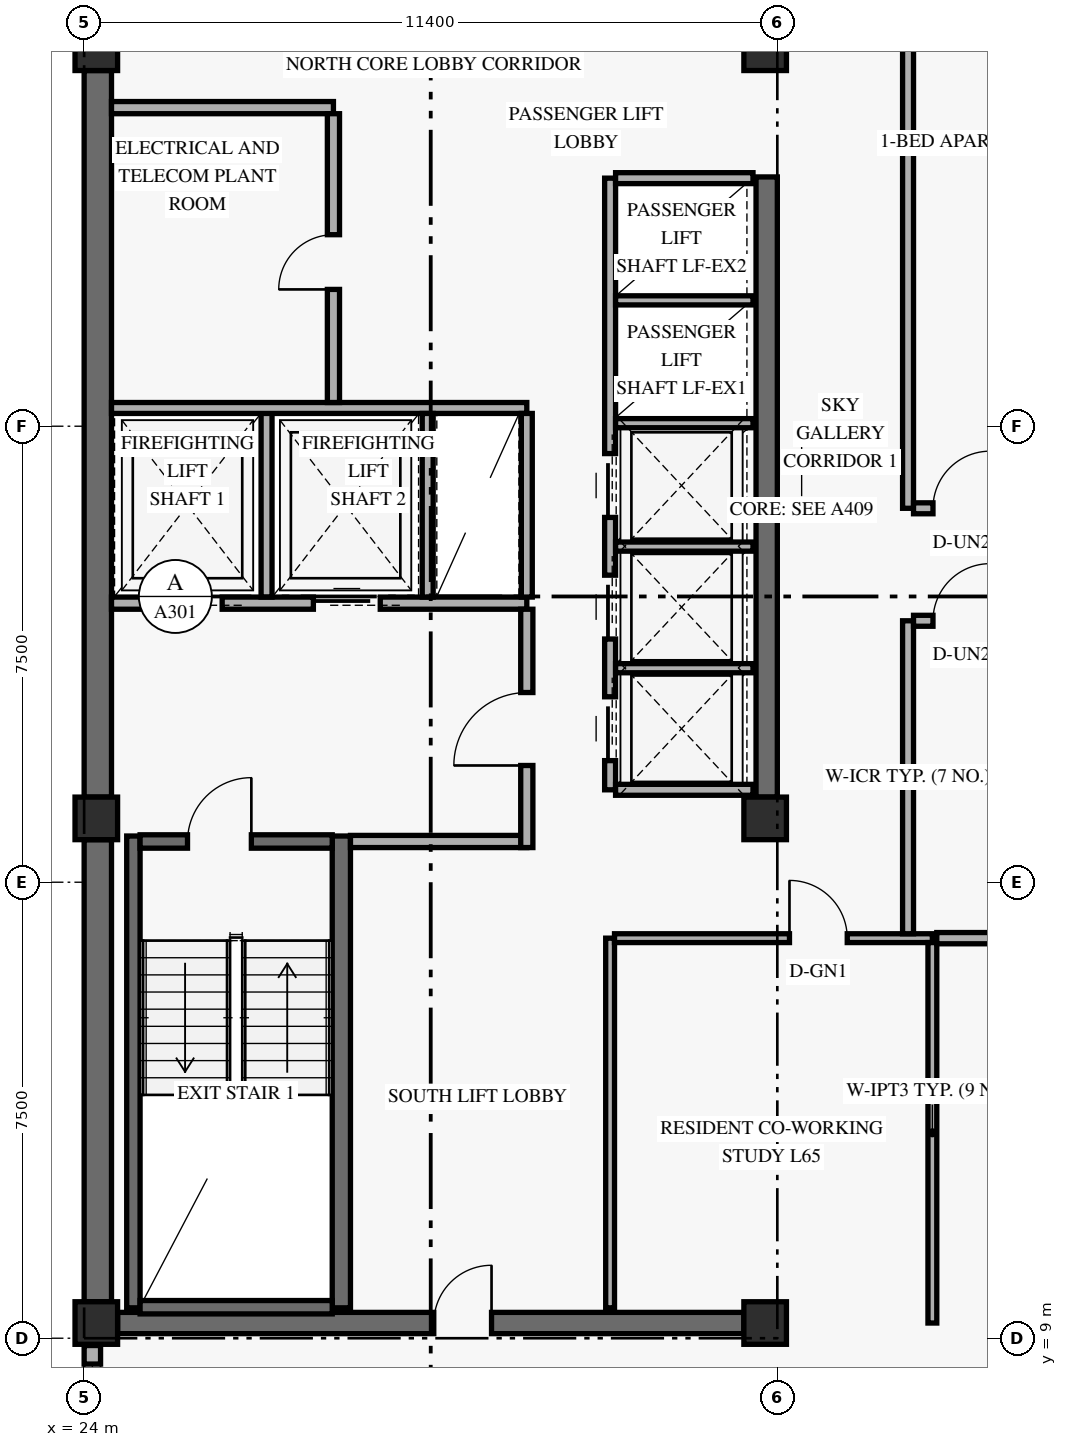
"""IFC4 building model, lengths in metres.
Left out: names, types, materials, properties, quantities, classifications, styles, units other than length and angle.
Written with IfcOpenShell. Run it as: python <this file> out.ifc"""

import sys

from ifc_helpers import new_model, si_unit, direction, frame, frame_2d, origin, origin_2d, place, context, subcontext, project, spatial, rectangle, extrude, element, fill, save


model = new_model("IFC4")
c1 = context("Model", 3, precision=1e-05, world=origin(), true_north=direction((0.0, 1.0)))
c2 = subcontext(c1, "Body", "Model", "MODEL_VIEW")
j1 = project(units=[si_unit("LENGTHUNIT", "METRE"), si_unit("PLANEANGLEUNIT", "RADIAN")], contexts=[c1])
p1 = place(None, origin())
s1 = spatial("IfcSite", under=j1, at=p1, CompositionType="ELEMENT")
p2 = place(p1, origin())
s2 = spatial("IfcBuilding", under=s1, at=p2, CompositionType="ELEMENT")
p3 = place(p2, frame((0.0, 0.0, 249.6)))
s3 = spatial("IfcBuildingStorey", under=s2, at=p3, CompositionType="ELEMENT", Elevation=249.6)
p4 = place(p3, frame((24.225, 9.6, 0.0), z_axis=(0.0, 0.0, 1.0), x_axis=(0.0, 1.0, 0.0)))
e1 = element("IfcWall", 1, at=p4, inside=s3, PredefinedType="SHEAR", context=c2, shape_type="SweptSolid", body=[
    extrude(rectangle(XDim=7.6, YDim=0.45, at=frame_2d((3.8, 0.0))), origin(), (0.0, 0.0, 1.0), 2.821),
])
p5 = place(p3, frame((24.225, 17.9, 0.0), z_axis=(0.0, 0.0, 1.0), x_axis=(0.0, 1.0, 0.0)))
e2 = element("IfcWall", 2, at=p5, inside=s3, PredefinedType="SHEAR", context=c2, shape_type="SweptSolid", body=[
    extrude(rectangle(XDim=11.95, YDim=0.45, at=frame_2d((5.975, 0.0))), origin(), (0.0, 0.0, 1.0), 2.821),
])
p6 = place(p3, frame((35.225, 17.9, 0.0), z_axis=(0.0, 0.0, 1.0), x_axis=(0.0, 1.0, 0.0)))
e3 = element("IfcWall", 3, at=p6, inside=s3, PredefinedType="SHEAR", context=c2, shape_type="SweptSolid", body=[
    extrude(rectangle(XDim=10.2, YDim=0.35, at=frame_2d((5.1, 0.0))), origin(), (0.0, 0.0, 1.0), 2.821),
])
p7 = place(p3, frame((24.55, 9.25, 0.0), z_axis=(0.0, 0.0, 1.0), x_axis=(1.0, 0.0, 0.0)))
e4 = element("IfcWall", 4, at=p7, inside=s3, PredefinedType="SHEAR", context=c2, shape_type="SweptSolid", body=[
    extrude(rectangle(XDim=10.3, YDim=0.35, at=frame_2d((5.15, 0.0))), origin(), (0.0, 0.0, 1.0), 3.36),
])
p8 = place(p7, frame((5.2, 0.0, 0.0)))
e5 = element("IfcOpeningElement", 5, at=p8, cuts=e4, PredefinedType="OPENING", context=c2, shape_type="SweptSolid", body=[
    extrude(rectangle(XDim=0.95, YDim=2.15, at=frame_2d((0.475, 1.075))), frame((0.0, 0.185, 0.0), z_axis=(0.0, -1.0, 0.0), x_axis=(1.0, 0.0, 0.0)), (0.0, 0.0, 1.0), 0.37),
])
p9 = place(p3, frame((24.81, 9.5, 0.0), z_axis=(0.0, 0.0, 1.0), x_axis=(0.0, 1.0, 0.0)))
e6 = element("IfcWall", 6, at=p9, inside=s3, PredefinedType="SHEAR", context=c2, shape_type="SweptSolid", body=[
    extrude(rectangle(XDim=7.76, YDim=0.22, at=frame_2d((3.88, 0.0))), origin(), (0.0, 0.0, 1.0), 3.36),
])
p10 = place(p3, frame((28.23, 9.5, 0.0), z_axis=(0.0, 0.0, 1.0), x_axis=(0.0, 1.0, 0.0)))
e7 = element("IfcWall", 7, at=p10, inside=s3, PredefinedType="SHEAR", context=c2, shape_type="SweptSolid", body=[
    extrude(rectangle(XDim=7.76, YDim=0.3, at=frame_2d((3.88, 0.0))), origin(), (0.0, 0.0, 1.0), 3.36),
])
p11 = place(p3, frame((24.92, 9.51, 0.0), z_axis=(0.0, 0.0, 1.0), x_axis=(1.0, 0.0, 0.0)))
e8 = element("IfcWall", 8, at=p11, inside=s3, PredefinedType="SHEAR", context=c2, shape_type="SweptSolid", body=[
    extrude(rectangle(XDim=3.16, YDim=0.22, at=frame_2d((1.58, 0.0))), origin(), (0.0, 0.0, 1.0), 3.36),
])
p12 = place(p3, frame((24.92, 17.17, 0.0), z_axis=(0.0, 0.0, 1.0), x_axis=(1.0, 0.0, 0.0)))
e9 = element("IfcWall", 9, at=p12, inside=s3, PredefinedType="SHEAR", context=c2, shape_type="SweptSolid", body=[
    extrude(rectangle(XDim=3.16, YDim=0.22, at=frame_2d((1.58, 0.0))), origin(), (0.0, 0.0, 1.0), 3.36),
])
p13 = place(p12, frame((0.78, 0.0, 0.0)))
e10 = element("IfcOpeningElement", 10, at=p13, cuts=e9, PredefinedType="OPENING", context=c2, shape_type="SweptSolid", body=[
    extrude(rectangle(XDim=1.05, YDim=2.15, at=frame_2d((0.525, 1.075))), frame((0.0, 0.12, 0.0), z_axis=(0.0, -1.0, 0.0), x_axis=(1.0, 0.0, 0.0)), (0.0, 0.0, 1.0), 0.24),
])
for number, where, z_axis, x_axis in (
    (11, (24.2, 9.25, 0.0), (0.0, 0.0, 1.0), (1.0, 0.0, 0.0)),
    (12, (24.2, 17.55, 0.0), (0.0, 0.0, 1.0), (1.0, 0.0, 0.0)),
    (13, (24.2, 30.2, 0.0), (0.0, 0.0, 1.0), (1.0, 0.0, 0.0)),
    (14, (35.2, 9.25, 0.0), (0.0, 0.0, 1.0), (1.0, 0.0, 0.0)),
    (15, (35.2, 17.55, 0.0), (0.0, 0.0, 1.0), (1.0, 0.0, 0.0)),
    (16, (35.2, 30.2, 0.0), (0.0, 0.0, 1.0), (1.0, 0.0, 0.0)),
):
    element("IfcColumn", number, at=place(p3, frame(where, z_axis=z_axis, x_axis=x_axis)), inside=s3, PredefinedType="COLUMN", context=c2, shape_type="SweptSolid", body=[
        extrude(rectangle(XDim=0.7, YDim=0.7, at=origin_2d()), origin(), (0.0, 0.0, 1.0), 3.6),
    ])
p14 = place(p3, frame((24.135, 7.32, 0.0), z_axis=(0.0, 0.0, 1.0), x_axis=(0.0, 1.0, 0.0)))
e17 = element("IfcWall", 17, at=p14, inside=s3, PredefinedType="SOLIDWALL", context=c2, shape_type="SweptSolid", body=[
    extrude(rectangle(XDim=1.56, YDim=0.27, at=frame_2d((0.78, 0.0))), origin(), (0.0, 0.0, 1.0), 2.803),
])
p15 = place(p14, frame((0.305, 0.0, 0.85)))
e18 = element("IfcOpeningElement", 18, at=p15, cuts=e17, PredefinedType="OPENING", context=c2, shape_type="SweptSolid", body=[
    extrude(rectangle(XDim=0.95, YDim=1.5, at=frame_2d((0.475, 0.75))), frame((0.0, 0.145, 0.0), z_axis=(0.0, -1.0, 0.0), x_axis=(1.0, 0.0, 0.0)), (0.0, 0.0, 1.0), 0.29),
])
p16 = place(p3, frame((24.45, 21.09, 0.0), z_axis=(0.0, 0.0, 1.0), x_axis=(1.0, 0.0, 0.0)))
e19 = element("IfcWall", 19, at=p16, inside=s3, PredefinedType="STANDARD", context=c2, shape_type="SweptSolid", body=[
    extrude(rectangle(XDim=6.83, YDim=0.2, at=frame_2d((3.415, 0.0))), origin(), (0.0, 0.0, 1.0), 3.36),
])
p17 = place(p16, frame((0.72, 0.0, 0.0)))
e20 = element("IfcOpeningElement", 20, at=p17, cuts=e19, PredefinedType="OPENING", context=c2, shape_type="SweptSolid", body=[
    extrude(rectangle(XDim=1.1, YDim=2.2, at=frame_2d((0.55, 1.1))), frame((0.0, 0.11, 0.0), z_axis=(0.0, -1.0, 0.0), x_axis=(1.0, 0.0, 0.0)), (0.0, 0.0, 1.0), 0.22),
])
p18 = place(p16, frame((3.32, 0.0, 0.0)))
e21 = element("IfcOpeningElement", 21, at=p18, cuts=e19, PredefinedType="OPENING", context=c2, shape_type="SweptSolid", body=[
    extrude(rectangle(XDim=1.1, YDim=2.2, at=frame_2d((0.55, 1.1))), frame((0.0, 0.11, 0.0), z_axis=(0.0, -1.0, 0.0), x_axis=(1.0, 0.0, 0.0)), (0.0, 0.0, 1.0), 0.22),
])
p19 = place(p3, frame((28.38, 17.17, 0.0), z_axis=(0.0, 0.0, 1.0), x_axis=(1.0, 0.0, 0.0)))
e22 = element("IfcWall", 22, at=p19, inside=s3, PredefinedType="STANDARD", context=c2, shape_type="SweptSolid", body=[
    extrude(rectangle(XDim=2.9, YDim=0.2, at=frame_2d((1.45, 0.0))), origin(), (0.0, 0.0, 1.0), 3.36),
])
p20 = place(p3, frame((31.28, 17.07, 0.0), z_axis=(0.0, 0.0, 1.0), x_axis=(0.0, 1.0, 0.0)))
e23 = element("IfcWall", 23, at=p20, inside=s3, PredefinedType="STANDARD", context=c2, shape_type="SweptSolid", body=[
    extrude(rectangle(XDim=3.92, YDim=0.2, at=frame_2d((1.96, 0.0))), origin(), (0.0, 0.0, 1.0), 2.803),
])
p21 = place(p20, frame((1.35, 0.0, 0.0)))
e24 = element("IfcOpeningElement", 24, at=p21, cuts=e23, PredefinedType="OPENING", context=c2, shape_type="SweptSolid", body=[
    extrude(rectangle(XDim=1.2, YDim=2.15, at=frame_2d((0.6, 1.075))), frame((0.0, 0.11, 0.0), z_axis=(0.0, -1.0, 0.0), x_axis=(1.0, 0.0, 0.0)), (0.0, 0.0, 1.0), 0.22),
])
p22 = place(p3, frame((27.0, 21.19, 0.0), z_axis=(0.0, 0.0, 1.0), x_axis=(0.0, 1.0, 0.0)))
e25 = element("IfcWall", 25, at=p22, inside=s3, PredefinedType="STANDARD", context=c2, shape_type="SweptSolid", body=[
    extrude(rectangle(XDim=3.11, YDim=0.18, at=frame_2d((1.555, 0.0))), origin(), (0.0, 0.0, 1.0), 3.36),
])
p23 = place(p3, frame((24.45, 24.3, 0.0), z_axis=(0.0, 0.0, 1.0), x_axis=(1.0, 0.0, 0.0)))
e26 = element("IfcWall", 26, at=p23, inside=s3, PredefinedType="STANDARD", context=c2, shape_type="SweptSolid", body=[
    extrude(rectangle(XDim=6.83, YDim=0.18, at=frame_2d((3.415, 0.0))), origin(), (0.0, 0.0, 1.0), 3.36),
])
for number, where, z_axis, x_axis in (
    (27, (29.65, 21.19, 0.0), (0.0, 0.0, 1.0), (0.0, 1.0, 0.0)),
    (28, (31.28, 21.19, 0.0), (0.0, 0.0, 1.0), (0.0, 1.0, 0.0)),
):
    element("IfcWall", number, at=place(p3, frame(where, z_axis=z_axis, x_axis=x_axis)), inside=s3, PredefinedType="STANDARD", context=c2, shape_type="SweptSolid", body=[
        extrude(rectangle(XDim=3.02, YDim=0.18, at=frame_2d((1.51, 0.0))), origin(), (0.0, 0.0, 1.0), 3.36),
    ])
p24 = place(p3, frame((24.45, 29.24, 0.0), z_axis=(0.0, 0.0, 1.0), x_axis=(1.0, 0.0, 0.0)))
e29 = element("IfcWall", 29, at=p24, inside=s3, PredefinedType="STANDARD", context=c2, shape_type="SweptSolid", body=[
    extrude(rectangle(XDim=3.65, YDim=0.2, at=frame_2d((1.825, 0.0))), origin(), (0.0, 0.0, 1.0), 3.36),
])
p25 = place(p3, frame((28.1, 24.39, 0.0), z_axis=(0.0, 0.0, 1.0), x_axis=(0.0, 1.0, 0.0)))
e30 = element("IfcWall", 30, at=p25, inside=s3, PredefinedType="STANDARD", context=c2, shape_type="SweptSolid", body=[
    extrude(rectangle(XDim=4.75, YDim=0.2, at=frame_2d((2.375, 0.0))), origin(), (0.0, 0.0, 1.0), 3.36),
])
p26 = place(p25, frame((1.86, 0.0, 0.0)))
e31 = element("IfcOpeningElement", 31, at=p26, cuts=e30, PredefinedType="OPENING", context=c2, shape_type="SweptSolid", body=[
    extrude(rectangle(XDim=0.9, YDim=2.1, at=frame_2d((0.45, 1.05))), frame((0.0, 0.11, 0.0), z_axis=(0.0, -1.0, 0.0), x_axis=(1.0, 0.0, 0.0)), (0.0, 0.0, 1.0), 0.22),
])
p27 = place(p3, frame((32.65, 18.02, 0.0), z_axis=(0.0, 0.0, 1.0), x_axis=(0.0, 1.0, 0.0)))
e32 = element("IfcWall", 32, at=p27, inside=s3, PredefinedType="STANDARD", context=c2, shape_type="SweptSolid", body=[
    extrude(rectangle(XDim=10.06, YDim=0.18, at=frame_2d((5.03, 0.0))), origin(), (0.0, 0.0, 1.0), 3.36),
])
p28 = place(p27, frame((0.48, 0.0, 0.0)))
e33 = element("IfcOpeningElement", 33, at=p28, cuts=e32, PredefinedType="OPENING", context=c2, shape_type="SweptSolid", body=[
    extrude(rectangle(XDim=1.05, YDim=2.2, at=frame_2d((0.525, 1.1))), frame((0.0, 0.1, 0.0), z_axis=(0.0, -1.0, 0.0), x_axis=(1.0, 0.0, 0.0)), (0.0, 0.0, 1.0), 0.2),
])
p29 = place(p27, frame((2.48, 0.0, 0.0)))
e34 = element("IfcOpeningElement", 34, at=p29, cuts=e32, PredefinedType="OPENING", context=c2, shape_type="SweptSolid", body=[
    extrude(rectangle(XDim=1.05, YDim=2.2, at=frame_2d((0.525, 1.1))), frame((0.0, 0.1, 0.0), z_axis=(0.0, -1.0, 0.0), x_axis=(1.0, 0.0, 0.0)), (0.0, 0.0, 1.0), 0.2),
])
p30 = place(p27, frame((4.48, 0.0, 0.0)))
e35 = element("IfcOpeningElement", 35, at=p30, cuts=e32, PredefinedType="OPENING", context=c2, shape_type="SweptSolid", body=[
    extrude(rectangle(XDim=1.05, YDim=2.2, at=frame_2d((0.525, 1.1))), frame((0.0, 0.1, 0.0), z_axis=(0.0, -1.0, 0.0), x_axis=(1.0, 0.0, 0.0)), (0.0, 0.0, 1.0), 0.2),
])
for number, where, z_axis, x_axis in (
    (36, (32.74, 18.02, 0.0), (0.0, 0.0, 1.0), (1.0, 0.0, 0.0)),
    (37, (32.74, 28.08, 0.0), (0.0, 0.0, 1.0), (1.0, 0.0, 0.0)),
):
    element("IfcWall", number, at=place(p3, frame(where, z_axis=z_axis, x_axis=x_axis)), inside=s3, PredefinedType="STANDARD", context=c2, shape_type="SweptSolid", body=[
        extrude(rectangle(XDim=2.26, YDim=0.18, at=frame_2d((1.13, 0.0))), origin(), (0.0, 0.0, 1.0), 3.36),
    ])
for number, where, z_axis, x_axis in (
    (38, (32.74, 20.02, 0.0), (0.0, 0.0, 1.0), (1.0, 0.0, 0.0)),
    (39, (32.74, 22.02, 0.0), (0.0, 0.0, 1.0), (1.0, 0.0, 0.0)),
    (40, (32.74, 24.05, 0.0), (0.0, 0.0, 1.0), (1.0, 0.0, 0.0)),
    (41, (32.74, 26.07, 0.0), (0.0, 0.0, 1.0), (1.0, 0.0, 0.0)),
):
    element("IfcWall", number, at=place(p3, frame(where, z_axis=z_axis, x_axis=x_axis)), inside=s3, PredefinedType="STANDARD", context=c2, shape_type="SweptSolid", body=[
        extrude(rectangle(XDim=2.26, YDim=0.15, at=frame_2d((1.13, 0.0))), origin(), (0.0, 0.0, 1.0), 3.36),
    ])
p31 = place(p3, frame((32.65, 9.5, 0.0), z_axis=(0.0, 0.0, 1.0), x_axis=(0.0, 1.0, 0.0)))
e42 = element("IfcWall", 42, at=p31, inside=s3, PredefinedType="PARTITIONING", context=c2, shape_type="SweptSolid", body=[
    extrude(rectangle(XDim=6.08, YDim=0.145, at=frame_2d((3.04, 0.0))), origin(), (0.0, 0.0, 1.0), 3.36),
])
p32 = place(p3, frame((32.722, 15.58, 0.0), z_axis=(0.0, 0.0, 1.0), x_axis=(1.0, 0.0, 0.0)))
e43 = element("IfcWall", 43, at=p32, inside=s3, PredefinedType="PARTITIONING", context=c2, shape_type="SweptSolid", body=[
    extrude(rectangle(XDim=5.228, YDim=0.145, at=frame_2d((2.614, 0.0))), origin(), (0.0, 0.0, 1.0), 2.803),
])
p33 = place(p32, frame((2.877, 0.0, 0.0)))
e44 = element("IfcOpeningElement", 44, at=p33, cuts=e43, PredefinedType="OPENING", context=c2, shape_type="SweptSolid", body=[
    extrude(rectangle(XDim=0.95, YDim=2.15, at=frame_2d((0.475, 1.075))), frame((0.0, 0.083, 0.0), z_axis=(0.0, -1.0, 0.0), x_axis=(1.0, 0.0, 0.0)), (0.0, 0.0, 1.0), 0.165),
])
p34 = place(p3, frame((37.95, 9.25, 0.0), z_axis=(0.0, 0.0, 1.0), x_axis=(0.0, 1.0, 0.0)))
e45 = element("IfcWall", 45, at=p34, inside=s3, PredefinedType="PARTITIONING", context=c2, shape_type="SweptSolid", body=[
    extrude(rectangle(XDim=6.258, YDim=0.145, at=frame_2d((3.129, 0.0))), origin(), (0.0, 0.0, 1.0), 2.803),
])
p35 = place(p3, frame((37.55, 15.653, 0.0), z_axis=(0.0, 0.0, 1.0), x_axis=(0.0, 1.0, 0.0)))
e46 = element("IfcWall", 46, at=p35, inside=s3, PredefinedType="STANDARD", context=c2, shape_type="SweptSolid", body=[
    extrude(rectangle(XDim=5.147, YDim=0.18, at=frame_2d((2.574, 0.0))), origin(), (0.0, 0.0, 1.0), 2.803),
])
p36 = place(p3, frame((37.55, 22.65, 0.0), z_axis=(0.0, 0.0, 1.0), x_axis=(0.0, 1.0, 0.0)))
e47 = element("IfcWall", 47, at=p36, inside=s3, PredefinedType="STANDARD", context=c2, shape_type="SweptSolid", body=[
    extrude(rectangle(XDim=8.628, YDim=0.18, at=frame_2d((4.314, 0.0))), origin(), (0.0, 0.0, 1.0), 2.803),
])
p37 = place(p3, frame((37.64, 20.8, 0.0), z_axis=(0.0, 0.0, 1.0), x_axis=(1.0, 0.0, 0.0)))
e48 = element("IfcWall", 48, at=p37, inside=s3, PredefinedType="STANDARD", context=c2, shape_type="SweptSolid", body=[
    extrude(rectangle(XDim=12.17, YDim=0.18, at=frame_2d((6.085, 0.0))), origin(), (0.0, 0.0, 1.0), 2.803),
])
p38 = place(p37, frame((0.32, 0.0, 0.0)))
e49 = element("IfcOpeningElement", 49, at=p38, cuts=e48, PredefinedType="OPENING", context=c2, shape_type="SweptSolid", body=[
    extrude(rectangle(XDim=0.94, YDim=2.15, at=frame_2d((0.47, 1.075))), frame((0.0, 0.1, 0.0), z_axis=(0.0, -1.0, 0.0), x_axis=(1.0, 0.0, 0.0)), (0.0, 0.0, 1.0), 0.2),
])
p39 = place(p3, frame((37.64, 22.65, 0.0), z_axis=(0.0, 0.0, 1.0), x_axis=(1.0, 0.0, 0.0)))
e50 = element("IfcWall", 50, at=p39, inside=s3, PredefinedType="STANDARD", context=c2, shape_type="SweptSolid", body=[
    extrude(rectangle(XDim=12.17, YDim=0.18, at=frame_2d((6.085, 0.0))), origin(), (0.0, 0.0, 1.0), 2.803),
])
p40 = place(p39, frame((0.32, 0.0, 0.0)))
e51 = element("IfcOpeningElement", 51, at=p40, cuts=e50, PredefinedType="OPENING", context=c2, shape_type="SweptSolid", body=[
    extrude(rectangle(XDim=0.94, YDim=2.15, at=frame_2d((0.47, 1.075))), frame((0.0, 0.1, 0.0), z_axis=(0.0, -1.0, 0.0), x_axis=(1.0, 0.0, 0.0)), (0.0, 0.0, 1.0), 0.2),
])
p41 = place(p3, frame((38.022, 15.58, 0.0), z_axis=(0.0, 0.0, 1.0), x_axis=(1.0, 0.0, 0.0)))
e52 = element("IfcWall", 52, at=p41, inside=s3, PredefinedType="PARTITIONING", context=c2, shape_type="SweptSolid", body=[
    extrude(rectangle(XDim=11.788, YDim=0.185, at=frame_2d((5.894, 0.0))), origin(), (0.0, 0.0, 1.0), 2.803),
])
p42 = place(p15, origin())
e53 = element("IfcWindow", 53, at=p42, inside=s3, PartitioningType="SINGLE_PANEL", PredefinedType="WINDOW", context=c2, shape_type="SweptSolid", body=[
    extrude(rectangle(XDim=0.95, YDim=1.5, at=frame_2d((0.475, 0.75))), frame((0.0, 0.03, 0.0), z_axis=(0.0, -1.0, 0.0), x_axis=(1.0, 0.0, 0.0)), (0.0, 0.0, 1.0), 0.06),
])
fill(e18, e53)
p43 = place(p13, frame((1.05, 0.0, 0.0), z_axis=(0.0, 0.0, 1.0), x_axis=(-1.0, 0.0, 0.0)))
e54 = element("IfcDoor", 54, at=p43, inside=s3, OperationType="SINGLE_SWING_LEFT", PredefinedType="DOOR", context=c2, shape_type="SweptSolid", body=[
    extrude(rectangle(XDim=1.05, YDim=2.15, at=frame_2d((0.525, 1.075))), frame((0.0, 0.025, 0.0), z_axis=(0.0, -1.0, 0.0), x_axis=(1.0, 0.0, 0.0)), (0.0, 0.0, 1.0), 0.05),
])
fill(e10, e54)
p44 = place(p17, origin())
e55 = element("IfcDoor", 55, at=p44, inside=s3, OperationType="SLIDING_TO_LEFT", PredefinedType="DOOR", context=c2, shape_type="SweptSolid", body=[
    extrude(rectangle(XDim=1.1, YDim=2.2, at=frame_2d((0.55, 1.1))), frame((0.0, 0.025, 0.0), z_axis=(0.0, -1.0, 0.0), x_axis=(1.0, 0.0, 0.0)), (0.0, 0.0, 1.0), 0.05),
])
fill(e20, e55)
p45 = place(p18, origin())
e56 = element("IfcDoor", 56, at=p45, inside=s3, OperationType="SLIDING_TO_LEFT", PredefinedType="DOOR", context=c2, shape_type="SweptSolid", body=[
    extrude(rectangle(XDim=1.1, YDim=2.2, at=frame_2d((0.55, 1.1))), frame((0.0, 0.025, 0.0), z_axis=(0.0, -1.0, 0.0), x_axis=(1.0, 0.0, 0.0)), (0.0, 0.0, 1.0), 0.05),
])
fill(e21, e56)
p46 = place(p21, origin())
e57 = element("IfcDoor", 57, at=p46, inside=s3, OperationType="SINGLE_SWING_LEFT", PredefinedType="DOOR", context=c2, shape_type="SweptSolid", body=[
    extrude(rectangle(XDim=1.2, YDim=2.15, at=frame_2d((0.6, 1.075))), frame((0.0, 0.025, 0.0), z_axis=(0.0, -1.0, 0.0), x_axis=(1.0, 0.0, 0.0)), (0.0, 0.0, 1.0), 0.05),
])
fill(e24, e57)
p47 = place(p26, origin())
e58 = element("IfcDoor", 58, at=p47, inside=s3, OperationType="SINGLE_SWING_LEFT", PredefinedType="DOOR", context=c2, shape_type="SweptSolid", body=[
    extrude(rectangle(XDim=0.9, YDim=2.1, at=frame_2d((0.45, 1.05))), frame((0.0, 0.025, 0.0), z_axis=(0.0, -1.0, 0.0), x_axis=(1.0, 0.0, 0.0)), (0.0, 0.0, 1.0), 0.05),
])
fill(e31, e58)
p48 = place(p28, origin())
e59 = element("IfcDoor", 59, at=p48, inside=s3, OperationType="SLIDING_TO_LEFT", PredefinedType="DOOR", context=c2, shape_type="SweptSolid", body=[
    extrude(rectangle(XDim=1.05, YDim=2.2, at=frame_2d((0.525, 1.1))), frame((0.0, 0.025, 0.0), z_axis=(0.0, -1.0, 0.0), x_axis=(1.0, 0.0, 0.0)), (0.0, 0.0, 1.0), 0.05),
])
fill(e33, e59)
p49 = place(p29, origin())
e60 = element("IfcDoor", 60, at=p49, inside=s3, OperationType="SLIDING_TO_LEFT", PredefinedType="DOOR", context=c2, shape_type="SweptSolid", body=[
    extrude(rectangle(XDim=1.05, YDim=2.2, at=frame_2d((0.525, 1.1))), frame((0.0, 0.025, 0.0), z_axis=(0.0, -1.0, 0.0), x_axis=(1.0, 0.0, 0.0)), (0.0, 0.0, 1.0), 0.05),
])
fill(e34, e60)
p50 = place(p30, origin())
e61 = element("IfcDoor", 61, at=p50, inside=s3, OperationType="SLIDING_TO_LEFT", PredefinedType="DOOR", context=c2, shape_type="SweptSolid", body=[
    extrude(rectangle(XDim=1.05, YDim=2.2, at=frame_2d((0.525, 1.1))), frame((0.0, 0.025, 0.0), z_axis=(0.0, -1.0, 0.0), x_axis=(1.0, 0.0, 0.0)), (0.0, 0.0, 1.0), 0.05),
])
fill(e35, e61)
p51 = place(p33, origin())
e62 = element("IfcDoor", 62, at=p51, inside=s3, OperationType="SINGLE_SWING_LEFT", PredefinedType="DOOR", context=c2, shape_type="SweptSolid", body=[
    extrude(rectangle(XDim=0.95, YDim=2.15, at=frame_2d((0.475, 1.075))), frame((0.0, 0.025, 0.0), z_axis=(0.0, -1.0, 0.0), x_axis=(1.0, 0.0, 0.0)), (0.0, 0.0, 1.0), 0.05),
])
fill(e44, e62)
p52 = place(p8, frame((0.95, 0.0, 0.0), z_axis=(0.0, 0.0, 1.0), x_axis=(-1.0, 0.0, 0.0)))
e63 = element("IfcDoor", 63, at=p52, inside=s3, OperationType="SINGLE_SWING_LEFT", PredefinedType="DOOR", context=c2, shape_type="SweptSolid", body=[
    extrude(rectangle(XDim=0.95, YDim=2.15, at=frame_2d((0.475, 1.075))), frame((0.0, 0.025, 0.0), z_axis=(0.0, -1.0, 0.0), x_axis=(1.0, 0.0, 0.0)), (0.0, 0.0, 1.0), 0.05),
])
fill(e5, e63)
p53 = place(p38, origin())
e64 = element("IfcDoor", 64, at=p53, inside=s3, OperationType="SINGLE_SWING_RIGHT", PredefinedType="DOOR", context=c2, shape_type="SweptSolid", body=[
    extrude(rectangle(XDim=0.94, YDim=2.15, at=frame_2d((0.47, 1.075))), frame((0.0, 0.025, 0.0), z_axis=(0.0, -1.0, 0.0), x_axis=(1.0, 0.0, 0.0)), (0.0, 0.0, 1.0), 0.05),
])
fill(e49, e64)
p54 = place(p40, origin())
e65 = element("IfcDoor", 65, at=p54, inside=s3, OperationType="SINGLE_SWING_RIGHT", PredefinedType="DOOR", context=c2, shape_type="SweptSolid", body=[
    extrude(rectangle(XDim=0.94, YDim=2.15, at=frame_2d((0.47, 1.075))), frame((0.0, 0.025, 0.0), z_axis=(0.0, -1.0, 0.0), x_axis=(1.0, 0.0, 0.0)), (0.0, 0.0, 1.0), 0.05),
])
fill(e51, e65)
save(model, sys.argv[1])
